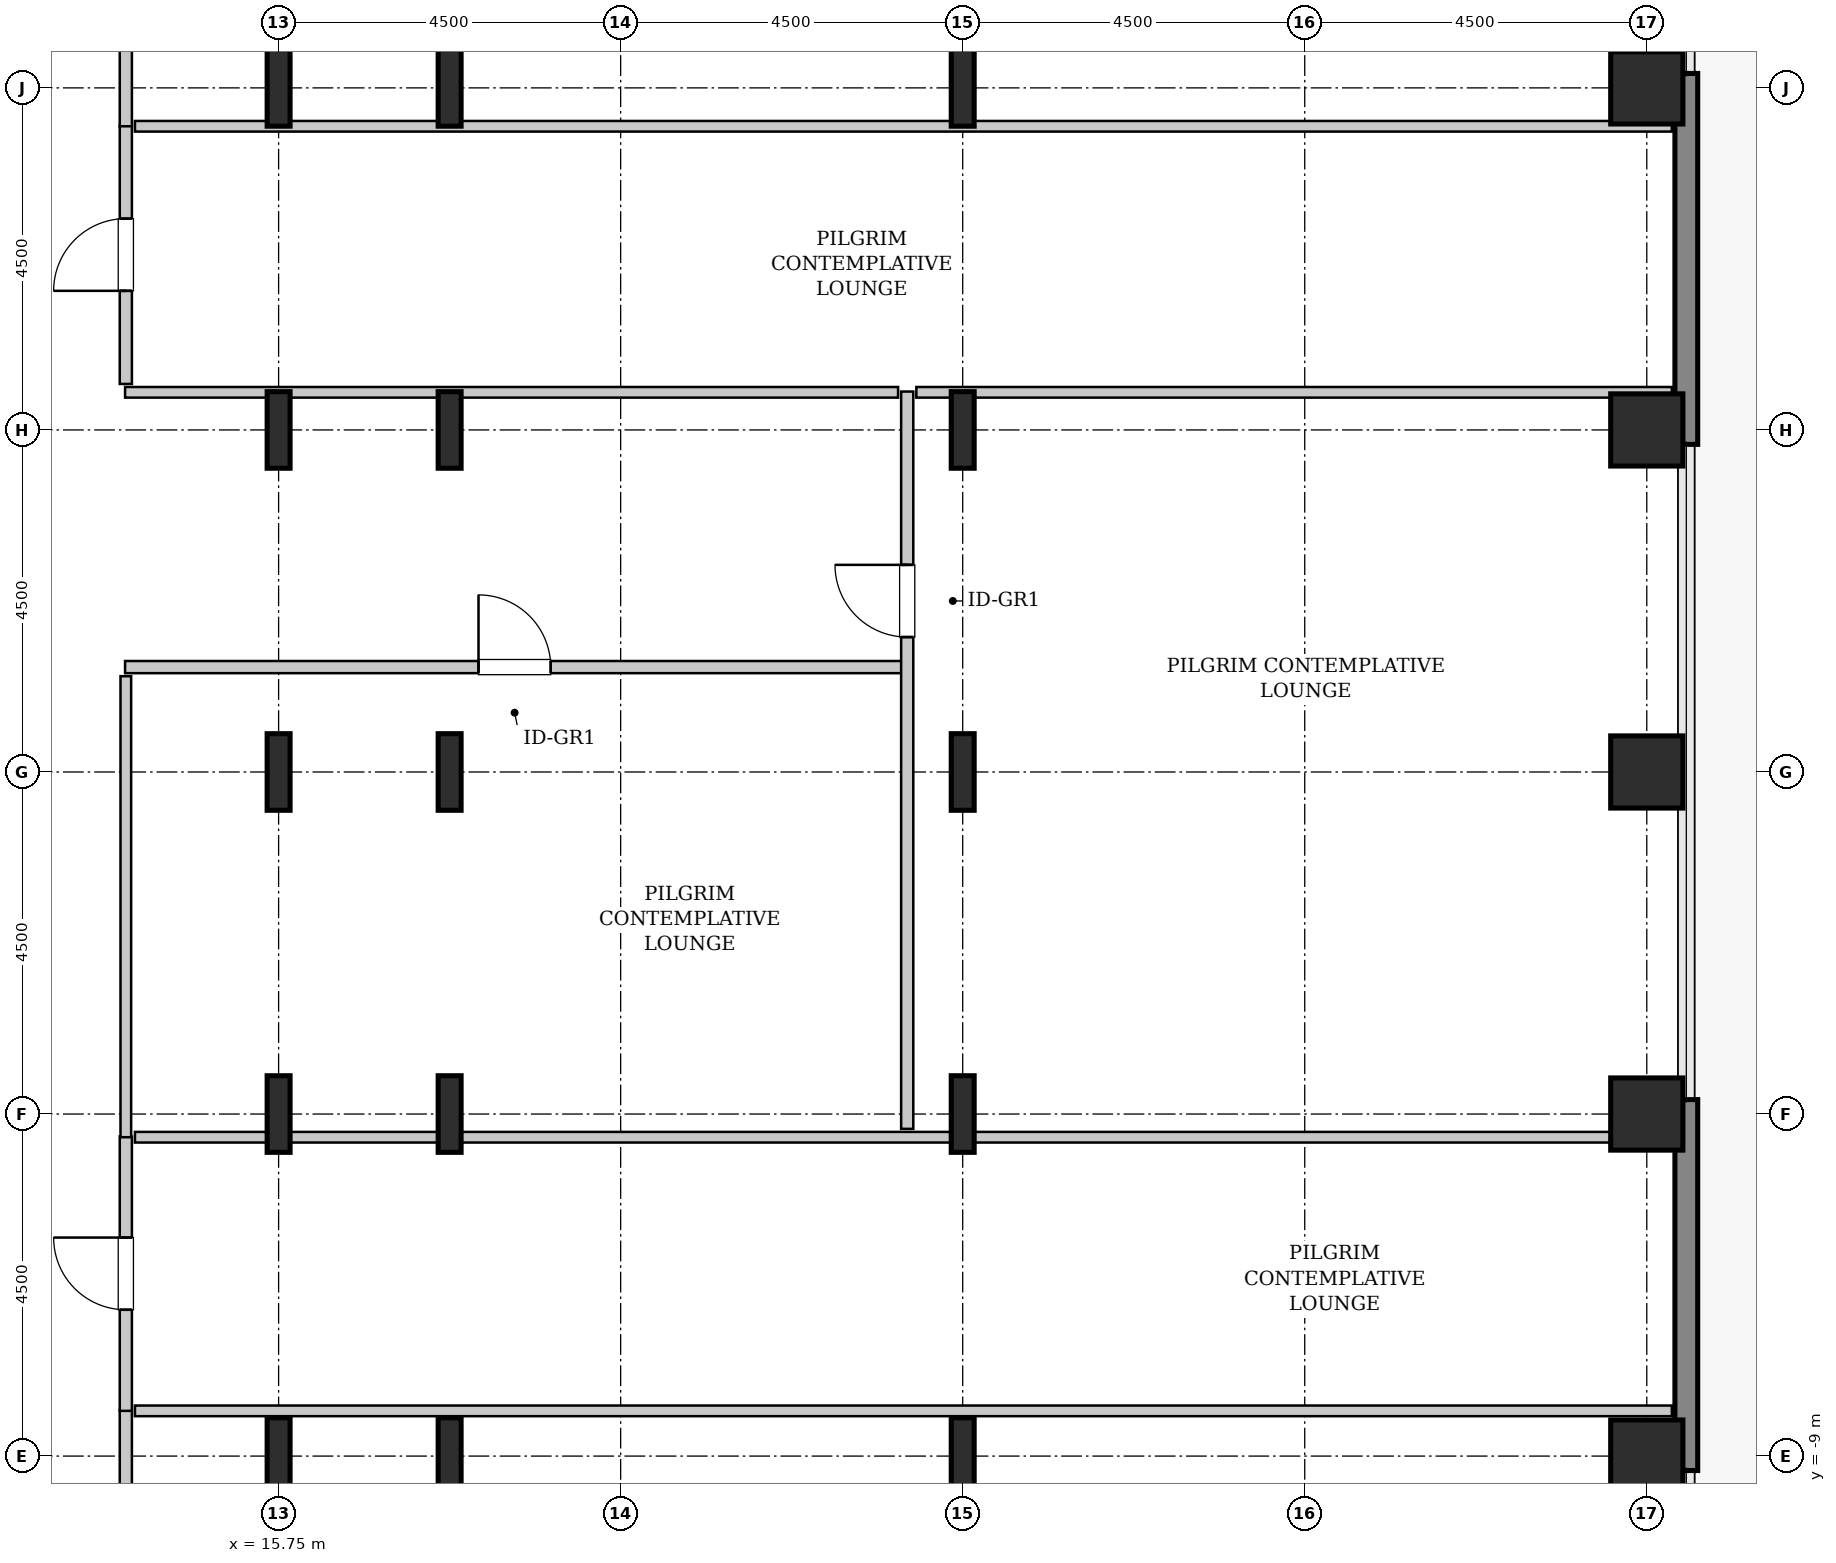
"""IFC4 building model, lengths in metres.
Left out: names, types, materials, properties, quantities, classifications, styles, units other than length and angle.
Written with IfcOpenShell. Run it as: python <this file> out.ifc"""

import sys

from ifc_helpers import new_model, si_unit, direction, frame, frame_2d, origin, origin_2d, place, context, subcontext, project, spatial, rectangle, hollow_rectangle, i_section, extrude, source, transform, mapped, element, fill, save


model = new_model("IFC4")
c1 = context("Model", 3, precision=1e-05, world=origin(), true_north=direction((0.0, 1.0)))
c2 = subcontext(c1, "Body", "Model", "MODEL_VIEW")
j1 = project(units=[si_unit("LENGTHUNIT", "METRE"), si_unit("PLANEANGLEUNIT", "RADIAN")], contexts=[c1])
p1 = place(None, origin())
s1 = spatial("IfcSite", under=j1, at=p1, CompositionType="ELEMENT")
p2 = place(p1, origin())
s2 = spatial("IfcBuilding", under=s1, at=p2, CompositionType="ELEMENT")
p3 = place(p2, frame((0.0, 0.0, 33.0)))
s3 = spatial("IfcBuildingStorey", under=s2, at=p3, CompositionType="ELEMENT", Elevation=33.0)
m1 = source(origin(), c2, "Body", "SweptSolid", [
    extrude(i_section(OverallWidth=0.302, OverallDepth=1.008, WebThickness=0.021, FlangeThickness=0.04, FilletRadius=0.03, at=origin_2d()), origin(), (0.0, 0.0, 1.0), 3.8),
])
for number, where, z_axis, x_axis in (
    (1, (15.75, -9.0, 0.0), (0.0, 0.0, 1.0), (1.0, 0.0, 0.0)),
    (2, (15.75, -4.5, 0.0), (0.0, 0.0, 1.0), (1.0, 0.0, 0.0)),
    (3, (15.75, 0.0, 0.0), (0.0, 0.0, 1.0), (1.0, 0.0, 0.0)),
    (4, (15.75, 4.5, 0.0), (0.0, 0.0, 1.0), (1.0, 0.0, 0.0)),
    (5, (15.75, 9.0, 0.0), (0.0, 0.0, 1.0), (1.0, 0.0, 0.0)),
    (6, (18.0, -9.0, 0.0), (0.0, 0.0, 1.0), (1.0, 0.0, 0.0)),
    (7, (18.0, -4.5, 0.0), (0.0, 0.0, 1.0), (1.0, 0.0, 0.0)),
    (8, (18.0, 0.0, 0.0), (0.0, 0.0, 1.0), (1.0, 0.0, 0.0)),
    (9, (18.0, 4.5, 0.0), (0.0, 0.0, 1.0), (1.0, 0.0, 0.0)),
    (10, (18.0, 9.0, 0.0), (0.0, 0.0, 1.0), (1.0, 0.0, 0.0)),
    (11, (24.75, -9.0, 0.0), (0.0, 0.0, 1.0), (1.0, 0.0, 0.0)),
    (12, (24.75, -4.5, 0.0), (0.0, 0.0, 1.0), (1.0, 0.0, 0.0)),
    (13, (24.75, 0.0, 0.0), (0.0, 0.0, 1.0), (1.0, 0.0, 0.0)),
    (14, (24.75, 4.5, 0.0), (0.0, 0.0, 1.0), (1.0, 0.0, 0.0)),
    (15, (24.75, 9.0, 0.0), (0.0, 0.0, 1.0), (1.0, 0.0, 0.0)),
):
    element("IfcColumn", number, at=place(p3, frame(where, z_axis=z_axis, x_axis=x_axis)), inside=s3, PredefinedType="COLUMN", context=c2, shape_type="MappedRepresentation", body=[
        mapped(m1, transform((0.0, 0.0, 0.0), x_axis=(1.0, 0.0, 0.0), y_axis=(0.0, 1.0, 0.0), z_axis=(0.0, 0.0, 1.0), scale=1.0)),
    ])
m2 = source(origin(), c2, "Body", "SweptSolid", [
    extrude(hollow_rectangle(XDim=0.95, YDim=0.95, WallThickness=0.045, InnerFilletRadius=0.045, OuterFilletRadius=0.09, at=origin_2d()), origin(), (0.0, 0.0, 1.0), 3.8),
])
for number, where, z_axis, x_axis in (
    (16, (33.75, -9.0, 0.0), (0.0, 0.0, 1.0), (1.0, 0.0, 0.0)),
    (17, (33.75, -4.5, 0.0), (0.0, 0.0, 1.0), (1.0, 0.0, 0.0)),
    (18, (33.75, 0.0, 0.0), (0.0, 0.0, 1.0), (1.0, 0.0, 0.0)),
    (19, (33.75, 4.5, 0.0), (0.0, 0.0, 1.0), (1.0, 0.0, 0.0)),
    (20, (33.75, 9.0, 0.0), (0.0, 0.0, 1.0), (1.0, 0.0, 0.0)),
):
    element("IfcColumn", number, at=place(p3, frame(where, z_axis=z_axis, x_axis=x_axis)), inside=s3, PredefinedType="COLUMN", context=c2, shape_type="MappedRepresentation", body=[
        mapped(m2, transform((0.0, 0.0, 0.0), x_axis=(1.0, 0.0, 0.0), y_axis=(0.0, 1.0, 0.0), z_axis=(0.0, 0.0, 1.0), scale=1.0)),
    ])
m3 = source(origin(), c2, "Body", "SweptSolid", [
    extrude(rectangle(XDim=4.88, YDim=0.3, at=frame_2d((2.44, 0.0))), origin(), (0.0, 0.0, 1.0), 3.55),
])
for number, where, z_axis, x_axis in (
    (21, (34.27, -9.19, 0.0), (0.0, 0.0, 1.0), (0.0, 1.0, 0.0)),
    (22, (34.27, 4.31, 0.0), (0.0, 0.0, 1.0), (0.0, 1.0, 0.0)),
):
    element("IfcWall", number, at=place(p3, frame(where, z_axis=z_axis, x_axis=x_axis)), inside=s3, PredefinedType="SHEAR", context=c2, shape_type="MappedRepresentation", body=[
        mapped(m3, transform((0.0, 0.0, 0.0), x_axis=(1.0, 0.0, 0.0), y_axis=(0.0, 1.0, 0.0), z_axis=(0.0, 0.0, 1.0), scale=1.0)),
    ])
m4 = source(origin(), c2, "Body", "SweptSolid", [
    extrude(rectangle(XDim=14.645, YDim=0.16, at=frame_2d((7.323, 0.0))), origin(), (0.0, 0.0, 1.0), 3.535),
])
p4 = place(p3, frame((13.74, -23.04, 0.0), z_axis=(0.0, 0.0, 1.0), x_axis=(0.0, 1.0, 0.0)))
e23 = element("IfcWall", 23, at=p4, inside=s3, PredefinedType="PARTITIONING", context=c2, shape_type="MappedRepresentation", body=[
    mapped(m4, transform((0.0, 0.0, 0.0), x_axis=(1.0, 0.0, 0.0), y_axis=(0.0, 1.0, 0.0), z_axis=(0.0, 0.0, 1.0), scale=1.0)),
])
p5 = place(p4, frame((12.613, 0.0, 0.0)))
e24 = element("IfcOpeningElement", 24, at=p5, cuts=e23, PredefinedType="OPENING", context=c2, shape_type="SweptSolid", body=[
    extrude(rectangle(XDim=0.95, YDim=2.1, at=frame_2d((0.475, 1.05))), frame((0.0, 0.09, 0.0), z_axis=(0.0, -1.0, 0.0), x_axis=(1.0, 0.0, 0.0)), (0.0, 0.0, 1.0), 0.18),
])
m5 = source(origin(), c2, "Body", "SweptSolid", [
    extrude(rectangle(XDim=20.22, YDim=0.14, at=frame_2d((10.11, 0.0))), origin(), (0.0, 0.0, 1.0), 3.535),
])
p6 = place(p3, frame((13.86, -8.405, 0.0), z_axis=(0.0, 0.0, 1.0), x_axis=(1.0, 0.0, 0.0)))
e25 = element("IfcWall", 25, at=p6, inside=s3, PredefinedType="PARTITIONING", context=c2, shape_type="MappedRepresentation", body=[
    mapped(m5, transform((0.0, 0.0, 0.0), x_axis=(1.0, 0.0, 0.0), y_axis=(0.0, 1.0, 0.0), z_axis=(0.0, 0.0, 1.0), scale=1.0)),
])
m6 = source(origin(), c2, "Body", "SweptSolid", [
    extrude(rectangle(XDim=3.61, YDim=0.16, at=frame_2d((1.805, 0.0))), origin(), (0.0, 0.0, 1.0), 3.535),
])
p7 = place(p3, frame((13.74, -8.405, 0.0), z_axis=(0.0, 0.0, 1.0), x_axis=(0.0, 1.0, 0.0)))
e26 = element("IfcWall", 26, at=p7, inside=s3, PredefinedType="PARTITIONING", context=c2, shape_type="MappedRepresentation", body=[
    mapped(m6, transform((0.0, 0.0, 0.0), x_axis=(1.0, 0.0, 0.0), y_axis=(0.0, 1.0, 0.0), z_axis=(0.0, 0.0, 1.0), scale=1.0)),
])
p8 = place(p7, frame((1.33, 0.0, 0.0)))
e27 = element("IfcOpeningElement", 27, at=p8, cuts=e26, PredefinedType="OPENING", context=c2, shape_type="SweptSolid", body=[
    extrude(rectangle(XDim=0.95, YDim=2.1, at=frame_2d((0.475, 1.05))), frame((0.0, 0.09, 0.0), z_axis=(0.0, -1.0, 0.0), x_axis=(1.0, 0.0, 0.0)), (0.0, 0.0, 1.0), 0.18),
])
m7 = source(origin(), c2, "Body", "SweptSolid", [
    extrude(rectangle(XDim=20.22, YDim=0.14, at=frame_2d((10.11, 0.0))), origin(), (0.0, 0.0, 1.0), 2.825),
])
p9 = place(p3, frame((13.86, -4.805, 0.0), z_axis=(0.0, 0.0, 1.0), x_axis=(1.0, 0.0, 0.0)))
e28 = element("IfcWall", 28, at=p9, inside=s3, PredefinedType="PARTITIONING", context=c2, shape_type="MappedRepresentation", body=[
    mapped(m7, transform((0.0, 0.0, 0.0), x_axis=(1.0, 0.0, 0.0), y_axis=(0.0, 1.0, 0.0), z_axis=(0.0, 0.0, 1.0), scale=1.0)),
])
m8 = source(origin(), c2, "Body", "SweptSolid", [
    extrude(rectangle(XDim=10.25, YDim=0.16, at=frame_2d((5.125, 0.0))), origin(), (0.0, 0.0, 1.0), 3.535),
])
p10 = place(p3, frame((13.73, 1.38, 0.0), z_axis=(0.0, 0.0, 1.0), x_axis=(1.0, 0.0, 0.0)))
e29 = element("IfcWall", 29, at=p10, inside=s3, PredefinedType="PARTITIONING", context=c2, shape_type="MappedRepresentation", body=[
    mapped(m8, transform((0.0, 0.0, 0.0), x_axis=(1.0, 0.0, 0.0), y_axis=(0.0, 1.0, 0.0), z_axis=(0.0, 0.0, 1.0), scale=1.0)),
])
p11 = place(p10, frame((4.65, 0.0, 0.0)))
e30 = element("IfcOpeningElement", 30, at=p11, cuts=e29, PredefinedType="OPENING", context=c2, shape_type="SweptSolid", body=[
    extrude(rectangle(XDim=0.95, YDim=2.1, at=frame_2d((0.475, 1.05))), frame((0.0, 0.09, 0.0), z_axis=(0.0, -1.0, 0.0), x_axis=(1.0, 0.0, 0.0)), (0.0, 0.0, 1.0), 0.18),
])
m9 = source(origin(), c2, "Body", "SweptSolid", [
    extrude(rectangle(XDim=6.065, YDim=0.14, at=frame_2d((3.032, 0.0))), origin(), (0.0, 0.0, 1.0), 3.535),
])
p12 = place(p3, frame((13.74, -4.805, 0.0), z_axis=(0.0, 0.0, 1.0), x_axis=(0.0, 1.0, 0.0)))
e31 = element("IfcWall", 31, at=p12, inside=s3, PredefinedType="PARTITIONING", context=c2, shape_type="MappedRepresentation", body=[
    mapped(m9, transform((0.0, 0.0, 0.0), x_axis=(1.0, 0.0, 0.0), y_axis=(0.0, 1.0, 0.0), z_axis=(0.0, 0.0, 1.0), scale=1.0)),
])
m10 = source(origin(), c2, "Body", "SweptSolid", [
    extrude(rectangle(XDim=9.7, YDim=0.16, at=frame_2d((4.85, 0.0))), origin(), (0.0, 0.0, 1.0), 3.535),
])
p13 = place(p3, frame((24.02, -4.695, 0.0), z_axis=(0.0, 0.0, 1.0), x_axis=(0.0, 1.0, 0.0)))
e32 = element("IfcWall", 32, at=p13, inside=s3, PredefinedType="PARTITIONING", context=c2, shape_type="MappedRepresentation", body=[
    mapped(m10, transform((0.0, 0.0, 0.0), x_axis=(1.0, 0.0, 0.0), y_axis=(0.0, 1.0, 0.0), z_axis=(0.0, 0.0, 1.0), scale=1.0)),
])
p14 = place(p13, frame((6.47, 0.0, 0.0)))
e33 = element("IfcOpeningElement", 33, at=p14, cuts=e32, PredefinedType="OPENING", context=c2, shape_type="SweptSolid", body=[
    extrude(rectangle(XDim=0.95, YDim=2.1, at=frame_2d((0.475, 1.05))), frame((0.0, 0.09, 0.0), z_axis=(0.0, -1.0, 0.0), x_axis=(1.0, 0.0, 0.0)), (0.0, 0.0, 1.0), 0.18),
])
m11 = source(origin(), c2, "Body", "SweptSolid", [
    extrude(rectangle(XDim=10.17, YDim=0.14, at=frame_2d((5.085, 0.0))), origin(), (0.0, 0.0, 1.0), 2.825),
])
p15 = place(p3, frame((13.73, 4.995, 0.0), z_axis=(0.0, 0.0, 1.0), x_axis=(1.0, 0.0, 0.0)))
e34 = element("IfcWall", 34, at=p15, inside=s3, PredefinedType="PARTITIONING", context=c2, shape_type="MappedRepresentation", body=[
    mapped(m11, transform((0.0, 0.0, 0.0), x_axis=(1.0, 0.0, 0.0), y_axis=(0.0, 1.0, 0.0), z_axis=(0.0, 0.0, 1.0), scale=1.0)),
])
m12 = source(origin(), c2, "Body", "SweptSolid", [
    extrude(rectangle(XDim=9.94, YDim=0.14, at=frame_2d((4.97, 0.0))), origin(), (0.0, 0.0, 1.0), 2.825),
])
p16 = place(p3, frame((24.14, 4.995, 0.0), z_axis=(0.0, 0.0, 1.0), x_axis=(1.0, 0.0, 0.0)))
e35 = element("IfcWall", 35, at=p16, inside=s3, PredefinedType="PARTITIONING", context=c2, shape_type="MappedRepresentation", body=[
    mapped(m12, transform((0.0, 0.0, 0.0), x_axis=(1.0, 0.0, 0.0), y_axis=(0.0, 1.0, 0.0), z_axis=(0.0, 0.0, 1.0), scale=1.0)),
])
m13 = source(origin(), c2, "Body", "SweptSolid", [
    extrude(rectangle(XDim=3.4, YDim=0.16, at=frame_2d((1.7, 0.0))), origin(), (0.0, 0.0, 1.0), 3.535),
])
p17 = place(p3, frame((13.74, 5.105, 0.0), z_axis=(0.0, 0.0, 1.0), x_axis=(0.0, 1.0, 0.0)))
e36 = element("IfcWall", 36, at=p17, inside=s3, PredefinedType="PARTITIONING", context=c2, shape_type="MappedRepresentation", body=[
    mapped(m13, transform((0.0, 0.0, 0.0), x_axis=(1.0, 0.0, 0.0), y_axis=(0.0, 1.0, 0.0), z_axis=(0.0, 0.0, 1.0), scale=1.0)),
])
p18 = place(p17, frame((1.225, 0.0, 0.0)))
e37 = element("IfcOpeningElement", 37, at=p18, cuts=e36, PredefinedType="OPENING", context=c2, shape_type="SweptSolid", body=[
    extrude(rectangle(XDim=0.95, YDim=2.1, at=frame_2d((0.475, 1.05))), frame((0.0, 0.09, 0.0), z_axis=(0.0, -1.0, 0.0), x_axis=(1.0, 0.0, 0.0)), (0.0, 0.0, 1.0), 0.18),
])
p19 = place(p3, frame((13.86, 8.495, 0.0), z_axis=(0.0, 0.0, 1.0), x_axis=(1.0, 0.0, 0.0)))
e38 = element("IfcWall", 38, at=p19, inside=s3, PredefinedType="PARTITIONING", context=c2, shape_type="MappedRepresentation", body=[
    mapped(m7, transform((0.0, 0.0, 0.0), x_axis=(1.0, 0.0, 0.0), y_axis=(0.0, 1.0, 0.0), z_axis=(0.0, 0.0, 1.0), scale=1.0)),
])
m14 = source(origin(), c2, "Body", "SweptSolid", [
    extrude(rectangle(XDim=14.545, YDim=0.16, at=frame_2d((7.272, 0.0))), origin(), (0.0, 0.0, 1.0), 3.535),
])
p20 = place(p3, frame((13.74, 8.495, 0.0), z_axis=(0.0, 0.0, 1.0), x_axis=(0.0, 1.0, 0.0)))
e39 = element("IfcWall", 39, at=p20, inside=s3, PredefinedType="PARTITIONING", context=c2, shape_type="MappedRepresentation", body=[
    mapped(m14, transform((0.0, 0.0, 0.0), x_axis=(1.0, 0.0, 0.0), y_axis=(0.0, 1.0, 0.0), z_axis=(0.0, 0.0, 1.0), scale=1.0)),
])
p21 = place(p20, frame((1.032, 0.0, 0.0)))
e40 = element("IfcOpeningElement", 40, at=p21, cuts=e39, PredefinedType="OPENING", context=c2, shape_type="SweptSolid", body=[
    extrude(rectangle(XDim=0.95, YDim=2.1, at=frame_2d((0.475, 1.05))), frame((0.0, 0.09, 0.0), z_axis=(0.0, -1.0, 0.0), x_axis=(1.0, 0.0, 0.0)), (0.0, 0.0, 1.0), 0.18),
])
m15 = source(origin(), c2, "Body", "SweptSolid", [
    extrude(rectangle(XDim=0.95, YDim=2.1, at=frame_2d((0.475, 1.05))), frame((0.0, 0.025, 0.0), z_axis=(0.0, -1.0, 0.0), x_axis=(1.0, 0.0, 0.0)), (0.0, 0.0, 1.0), 0.05),
])
p22 = place(p8, origin())
e41 = element("IfcDoor", 41, at=p22, inside=s3, OperationType="SINGLE_SWING_RIGHT", PredefinedType="DOOR", context=c2, shape_type="MappedRepresentation", body=[
    mapped(m15, transform((0.0, 0.0, 0.0), x_axis=(1.0, 0.0, 0.0), y_axis=(0.0, 1.0, 0.0), z_axis=(0.0, 0.0, 1.0), scale=1.0)),
])
fill(e27, e41)
p23 = place(p11, origin())
e42 = element("IfcDoor", 42, at=p23, inside=s3, OperationType="SINGLE_SWING_LEFT", PredefinedType="DOOR", context=c2, shape_type="MappedRepresentation", body=[
    mapped(m15, transform((0.0, 0.0, 0.0), x_axis=(1.0, 0.0, 0.0), y_axis=(0.0, 1.0, 0.0), z_axis=(0.0, 0.0, 1.0), scale=1.0)),
])
fill(e30, e42)
p24 = place(p14, origin())
e43 = element("IfcDoor", 43, at=p24, inside=s3, OperationType="SINGLE_SWING_RIGHT", PredefinedType="DOOR", context=c2, shape_type="MappedRepresentation", body=[
    mapped(m15, transform((0.0, 0.0, 0.0), x_axis=(1.0, 0.0, 0.0), y_axis=(0.0, 1.0, 0.0), z_axis=(0.0, 0.0, 1.0), scale=1.0)),
])
fill(e33, e43)
p25 = place(p18, origin())
e44 = element("IfcDoor", 44, at=p25, inside=s3, OperationType="SINGLE_SWING_LEFT", PredefinedType="DOOR", context=c2, shape_type="MappedRepresentation", body=[
    mapped(m15, transform((0.0, 0.0, 0.0), x_axis=(1.0, 0.0, 0.0), y_axis=(0.0, 1.0, 0.0), z_axis=(0.0, 0.0, 1.0), scale=1.0)),
])
fill(e37, e44)
save(model, sys.argv[1])
